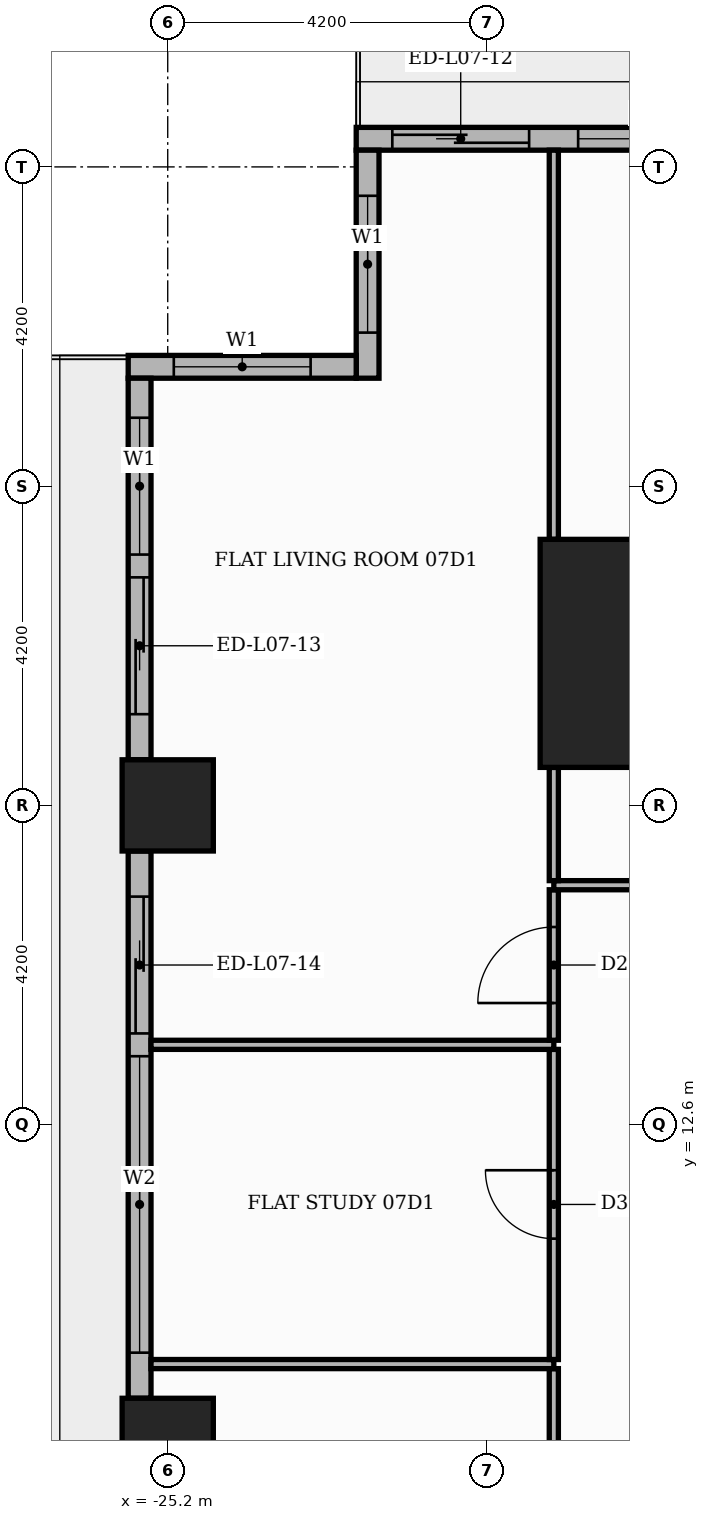
"""IFC4 building model, lengths in metres.
Left out: names, types, materials, properties, quantities, classifications, styles, units other than length and angle.
Written with IfcOpenShell. Run it as: python <this file> out.ifc"""

import sys

from ifc_helpers import new_model, si_unit, direction, frame, frame_2d, origin, origin_2d, place, context, subcontext, project, spatial, rectangle, extrude, element, fill, save


model = new_model("IFC4")
c1 = context("Model", 3, precision=1e-05, world=origin(), true_north=direction((0.0, 1.0)))
c2 = subcontext(c1, "Body", "Model", "MODEL_VIEW")
j1 = project(units=[si_unit("LENGTHUNIT", "METRE"), si_unit("PLANEANGLEUNIT", "RADIAN")], contexts=[c1])
p1 = place(None, origin())
s1 = spatial("IfcSite", under=j1, at=p1, CompositionType="ELEMENT")
p2 = place(p1, origin())
s2 = spatial("IfcBuilding", under=s1, at=p2, CompositionType="ELEMENT")
p3 = place(p2, frame((0.0, 0.0, 34.8)))
s3 = spatial("IfcBuildingStorey", under=s2, at=p3, CompositionType="ELEMENT", Elevation=34.8)
p4 = place(p3, frame((-18.8, 18.8, 0.0), z_axis=(0.0, 0.0, 1.0), x_axis=(1.0, 0.0, 0.0)))
e1 = element("IfcColumn", 1, at=p4, inside=s3, PredefinedType="COLUMN", context=c2, shape_type="SweptSolid", body=[
    extrude(rectangle(XDim=3.0, YDim=3.0, at=origin_2d()), origin(), (0.0, 0.0, 1.0), 3.9),
])
for number, where, z_axis, x_axis in (
    (2, (-25.2, 8.4, 0.0), (0.0, 0.0, 1.0), (1.0, 0.0, 0.0)),
    (3, (-25.2, 16.8, 0.0), (0.0, 0.0, 1.0), (1.0, 0.0, 0.0)),
):
    element("IfcColumn", number, at=place(p3, frame(where, z_axis=z_axis, x_axis=x_axis)), inside=s3, PredefinedType="COLUMN", context=c2, shape_type="SweptSolid", body=[
        extrude(rectangle(XDim=1.2, YDim=1.2, at=origin_2d()), origin(), (0.0, 0.0, 1.0), 3.9),
    ])
p5 = place(p3, frame((-17.4, 25.57, 0.0), z_axis=(0.0, 0.0, 1.0), x_axis=(-1.0, 0.0, 0.0)))
e4 = element("IfcWall", 4, at=p5, inside=s3, PredefinedType="STANDARD", context=c2, shape_type="SweptSolid", body=[
    extrude(rectangle(XDim=5.32, YDim=0.3, at=frame_2d((2.66, 0.0))), origin(), (0.0, 0.0, 1.0), 3.48),
])
p6 = place(p5, frame((0.6, 0.0, 0.9)))
e5 = element("IfcOpeningElement", 5, at=p6, cuts=e4, PredefinedType="OPENING", context=c2, shape_type="SweptSolid", body=[
    extrude(rectangle(XDim=1.8, YDim=2.1, at=frame_2d((0.9, 1.05))), frame((0.0, 0.16, 0.0), z_axis=(0.0, -1.0, 0.0), x_axis=(1.0, 0.0, 0.0)), (0.0, 0.0, 1.0), 0.32),
])
p7 = place(p5, frame((3.045, 0.0, 0.0)))
e6 = element("IfcOpeningElement", 6, at=p7, cuts=e4, PredefinedType="OPENING", context=c2, shape_type="SweptSolid", body=[
    extrude(rectangle(XDim=1.8, YDim=2.4, at=frame_2d((0.9, 1.2))), frame((0.0, 0.16, 0.0), z_axis=(0.0, -1.0, 0.0), x_axis=(1.0, 0.0, 0.0)), (0.0, 0.0, 1.0), 0.32),
])
p8 = place(p3, frame((-22.57, 25.42, 0.0), z_axis=(0.0, 0.0, 1.0), x_axis=(0.0, -1.0, 0.0)))
e7 = element("IfcWall", 7, at=p8, inside=s3, PredefinedType="STANDARD", context=c2, shape_type="SweptSolid", body=[
    extrude(rectangle(XDim=3.0, YDim=0.3, at=frame_2d((1.5, 0.0))), origin(), (0.0, 0.0, 1.0), 3.48),
])
p9 = place(p8, frame((0.6, 0.0, 0.9)))
e8 = element("IfcOpeningElement", 8, at=p9, cuts=e7, PredefinedType="OPENING", context=c2, shape_type="SweptSolid", body=[
    extrude(rectangle(XDim=1.8, YDim=2.1, at=frame_2d((0.9, 1.05))), frame((0.0, 0.16, 0.0), z_axis=(0.0, -1.0, 0.0), x_axis=(1.0, 0.0, 0.0)), (0.0, 0.0, 1.0), 0.32),
])
p10 = place(p3, frame((-22.72, 22.57, 0.0), z_axis=(0.0, 0.0, 1.0), x_axis=(-1.0, 0.0, 0.0)))
e9 = element("IfcWall", 9, at=p10, inside=s3, PredefinedType="STANDARD", context=c2, shape_type="SweptSolid", body=[
    extrude(rectangle(XDim=3.0, YDim=0.3, at=frame_2d((1.5, 0.0))), origin(), (0.0, 0.0, 1.0), 3.48),
])
p11 = place(p10, frame((0.6, 0.0, 0.9)))
e10 = element("IfcOpeningElement", 10, at=p11, cuts=e9, PredefinedType="OPENING", context=c2, shape_type="SweptSolid", body=[
    extrude(rectangle(XDim=1.8, YDim=2.1, at=frame_2d((0.9, 1.05))), frame((0.0, 0.16, 0.0), z_axis=(0.0, -1.0, 0.0), x_axis=(1.0, 0.0, 0.0)), (0.0, 0.0, 1.0), 0.32),
])
p12 = place(p3, frame((-25.57, 22.42, 0.0), z_axis=(0.0, 0.0, 1.0), x_axis=(0.0, -1.0, 0.0)))
e11 = element("IfcWall", 11, at=p12, inside=s3, PredefinedType="STANDARD", context=c2, shape_type="SweptSolid", body=[
    extrude(rectangle(XDim=5.02, YDim=0.3, at=frame_2d((2.51, 0.0))), origin(), (0.0, 0.0, 1.0), 3.48),
])
p13 = place(p12, frame((0.52, 0.0, 0.9)))
e12 = element("IfcOpeningElement", 12, at=p13, cuts=e11, PredefinedType="OPENING", context=c2, shape_type="SweptSolid", body=[
    extrude(rectangle(XDim=1.8, YDim=2.1, at=frame_2d((0.9, 1.05))), frame((0.0, 0.16, 0.0), z_axis=(0.0, -1.0, 0.0), x_axis=(1.0, 0.0, 0.0)), (0.0, 0.0, 1.0), 0.32),
])
p14 = place(p12, frame((2.62, 0.0, 0.0)))
e13 = element("IfcOpeningElement", 13, at=p14, cuts=e11, PredefinedType="OPENING", context=c2, shape_type="SweptSolid", body=[
    extrude(rectangle(XDim=1.8, YDim=2.4, at=frame_2d((0.9, 1.2))), frame((0.0, 0.16, 0.0), z_axis=(0.0, -1.0, 0.0), x_axis=(1.0, 0.0, 0.0)), (0.0, 0.0, 1.0), 0.32),
])
p15 = place(p3, frame((-25.57, 16.2, 0.0), z_axis=(0.0, 0.0, 1.0), x_axis=(0.0, -1.0, 0.0)))
e14 = element("IfcWall", 14, at=p15, inside=s3, PredefinedType="STANDARD", context=c2, shape_type="SweptSolid", body=[
    extrude(rectangle(XDim=7.2, YDim=0.3, at=frame_2d((3.6, 0.0))), origin(), (0.0, 0.0, 1.0), 3.48),
])
p16 = place(p15, frame((0.6, 0.0, 0.0)))
e15 = element("IfcOpeningElement", 15, at=p16, cuts=e14, PredefinedType="OPENING", context=c2, shape_type="SweptSolid", body=[
    extrude(rectangle(XDim=1.8, YDim=2.4, at=frame_2d((0.9, 1.2))), frame((0.0, 0.16, 0.0), z_axis=(0.0, -1.0, 0.0), x_axis=(1.0, 0.0, 0.0)), (0.0, 0.0, 1.0), 0.32),
])
p17 = place(p15, frame((2.7, 0.0, 0.9)))
e16 = element("IfcOpeningElement", 16, at=p17, cuts=e14, PredefinedType="OPENING", context=c2, shape_type="SweptSolid", body=[
    extrude(rectangle(XDim=3.9, YDim=2.1, at=frame_2d((1.95, 1.05))), frame((0.0, 0.16, 0.0), z_axis=(0.0, -1.0, 0.0), x_axis=(1.0, 0.0, 0.0)), (0.0, 0.0, 1.0), 0.32),
])
p18 = place(p3, frame((-20.12, 3.21, 0.0), z_axis=(0.0, 0.0, 1.0), x_axis=(0.0, 1.0, 0.0)))
e17 = element("IfcWall", 17, at=p18, inside=s3, PredefinedType="PARTITIONING", context=c2, shape_type="SweptSolid", body=[
    extrude(rectangle(XDim=6.18, YDim=0.12, at=frame_2d((3.09, 0.0))), origin(), (0.0, 0.0, 1.0), 3.48),
])
p19 = place(p18, frame((2.64, 0.0, 0.0)))
e18 = element("IfcOpeningElement", 18, at=p19, cuts=e17, PredefinedType="OPENING", context=c2, shape_type="SweptSolid", body=[
    extrude(rectangle(XDim=0.9, YDim=2.1, at=frame_2d((0.45, 1.05))), frame((0.0, 0.07, 0.0), z_axis=(0.0, -1.0, 0.0), x_axis=(1.0, 0.0, 0.0)), (0.0, 0.0, 1.0), 0.14),
])
p20 = place(p3, frame((-25.42, 9.45, 0.0), z_axis=(0.0, 0.0, 1.0), x_axis=(1.0, 0.0, 0.0)))
e19 = element("IfcWall", 19, at=p20, inside=s3, PredefinedType="PARTITIONING", context=c2, shape_type="SweptSolid", body=[
    extrude(rectangle(XDim=5.3, YDim=0.12, at=frame_2d((2.65, 0.0))), origin(), (0.0, 0.0, 1.0), 3.48),
])
p21 = place(p3, frame((-20.12, 9.51, 0.0), z_axis=(0.0, 0.0, 1.0), x_axis=(0.0, 1.0, 0.0)))
e20 = element("IfcWall", 20, at=p21, inside=s3, PredefinedType="PARTITIONING", context=c2, shape_type="SweptSolid", body=[
    extrude(rectangle(XDim=4.08, YDim=0.12, at=frame_2d((2.04, 0.0))), origin(), (0.0, 0.0, 1.0), 3.48),
])
p22 = place(p21, frame((1.59, 0.0, 0.0)))
e21 = element("IfcOpeningElement", 21, at=p22, cuts=e20, PredefinedType="OPENING", context=c2, shape_type="SweptSolid", body=[
    extrude(rectangle(XDim=0.9, YDim=2.1, at=frame_2d((0.45, 1.05))), frame((0.0, 0.07, 0.0), z_axis=(0.0, -1.0, 0.0), x_axis=(1.0, 0.0, 0.0)), (0.0, 0.0, 1.0), 0.14),
])
p23 = place(p3, frame((-25.42, 13.65, 0.0), z_axis=(0.0, 0.0, 1.0), x_axis=(1.0, 0.0, 0.0)))
e22 = element("IfcWall", 22, at=p23, inside=s3, PredefinedType="PARTITIONING", context=c2, shape_type="SweptSolid", body=[
    extrude(rectangle(XDim=5.3, YDim=0.12, at=frame_2d((2.65, 0.0))), origin(), (0.0, 0.0, 1.0), 3.48),
])
p24 = place(p3, frame((-20.12, 13.71, 0.0), z_axis=(0.0, 0.0, 1.0), x_axis=(0.0, 1.0, 0.0)))
e23 = element("IfcWall", 23, at=p24, inside=s3, PredefinedType="PARTITIONING", context=c2, shape_type="SweptSolid", body=[
    extrude(rectangle(XDim=1.98, YDim=0.12, at=frame_2d((0.99, 0.0))), origin(), (0.0, 0.0, 1.0), 3.48),
])
p25 = place(p24, frame((0.49, 0.0, 0.0)))
e24 = element("IfcOpeningElement", 24, at=p25, cuts=e23, PredefinedType="OPENING", context=c2, shape_type="SweptSolid", body=[
    extrude(rectangle(XDim=1.0, YDim=2.1, at=frame_2d((0.5, 1.05))), frame((0.0, 0.07, 0.0), z_axis=(0.0, -1.0, 0.0), x_axis=(1.0, 0.0, 0.0)), (0.0, 0.0, 1.0), 0.14),
])
p26 = place(p3, frame((-20.12, 15.75, 0.0), z_axis=(0.0, 0.0, 1.0), x_axis=(1.0, 0.0, 0.0)))
e25 = element("IfcWall", 25, at=p26, inside=s3, PredefinedType="PARTITIONING", context=c2, shape_type="SweptSolid", body=[
    extrude(rectangle(XDim=6.37, YDim=0.12, at=frame_2d((3.185, 0.0))), origin(), (0.0, 0.0, 1.0), 3.48),
])
p27 = place(p26, frame((2.785, 0.0, 0.0)))
e26 = element("IfcOpeningElement", 26, at=p27, cuts=e25, PredefinedType="OPENING", context=c2, shape_type="SweptSolid", body=[
    extrude(rectangle(XDim=0.9, YDim=2.1, at=frame_2d((0.45, 1.05))), frame((0.0, 0.07, 0.0), z_axis=(0.0, -1.0, 0.0), x_axis=(1.0, 0.0, 0.0)), (0.0, 0.0, 1.0), 0.14),
])
p28 = place(p3, frame((-20.12, 15.81, 0.0), z_axis=(0.0, 0.0, 1.0), x_axis=(0.0, 1.0, 0.0)))
e27 = element("IfcWall", 27, at=p28, inside=s3, PredefinedType="PARTITIONING", context=c2, shape_type="SweptSolid", body=[
    extrude(rectangle(XDim=1.49, YDim=0.12, at=frame_2d((0.745, 0.0))), origin(), (0.0, 0.0, 1.0), 3.48),
])
p29 = place(p3, frame((-20.12, 20.3, 0.0), z_axis=(0.0, 0.0, 1.0), x_axis=(0.0, 1.0, 0.0)))
e28 = element("IfcWall", 28, at=p29, inside=s3, PredefinedType="PARTITIONING", context=c2, shape_type="SweptSolid", body=[
    extrude(rectangle(XDim=5.12, YDim=0.12, at=frame_2d((2.56, 0.0))), origin(), (0.0, 0.0, 1.0), 3.48),
])
p30 = place(p6, origin())
e29 = element("IfcWindow", 29, at=p30, inside=s3, PartitioningType="SINGLE_PANEL", PredefinedType="WINDOW", context=c2, shape_type="SweptSolid", body=[
    extrude(rectangle(XDim=1.8, YDim=2.1, at=frame_2d((0.9, 1.05))), frame((0.0, 0.03, 0.0), z_axis=(0.0, -1.0, 0.0), x_axis=(1.0, 0.0, 0.0)), (0.0, 0.0, 1.0), 0.06),
])
fill(e5, e29)
p31 = place(p7, origin())
e30 = element("IfcDoor", 30, at=p31, inside=s3, OperationType="SLIDING_TO_RIGHT", PredefinedType="DOOR", context=c2, shape_type="SweptSolid", body=[
    extrude(rectangle(XDim=1.8, YDim=2.4, at=frame_2d((0.9, 1.2))), frame((0.0, 0.025, 0.0), z_axis=(0.0, -1.0, 0.0), x_axis=(1.0, 0.0, 0.0)), (0.0, 0.0, 1.0), 0.05),
])
fill(e6, e30)
p32 = place(p9, origin())
e31 = element("IfcWindow", 31, at=p32, inside=s3, PartitioningType="SINGLE_PANEL", PredefinedType="WINDOW", context=c2, shape_type="SweptSolid", body=[
    extrude(rectangle(XDim=1.8, YDim=2.1, at=frame_2d((0.9, 1.05))), frame((0.0, 0.03, 0.0), z_axis=(0.0, -1.0, 0.0), x_axis=(1.0, 0.0, 0.0)), (0.0, 0.0, 1.0), 0.06),
])
fill(e8, e31)
p33 = place(p11, origin())
e32 = element("IfcWindow", 32, at=p33, inside=s3, PartitioningType="SINGLE_PANEL", PredefinedType="WINDOW", context=c2, shape_type="SweptSolid", body=[
    extrude(rectangle(XDim=1.8, YDim=2.1, at=frame_2d((0.9, 1.05))), frame((0.0, 0.03, 0.0), z_axis=(0.0, -1.0, 0.0), x_axis=(1.0, 0.0, 0.0)), (0.0, 0.0, 1.0), 0.06),
])
fill(e10, e32)
p34 = place(p13, origin())
e33 = element("IfcWindow", 33, at=p34, inside=s3, PartitioningType="SINGLE_PANEL", PredefinedType="WINDOW", context=c2, shape_type="SweptSolid", body=[
    extrude(rectangle(XDim=1.8, YDim=2.1, at=frame_2d((0.9, 1.05))), frame((0.0, 0.03, 0.0), z_axis=(0.0, -1.0, 0.0), x_axis=(1.0, 0.0, 0.0)), (0.0, 0.0, 1.0), 0.06),
])
fill(e12, e33)
p35 = place(p14, origin())
e34 = element("IfcDoor", 34, at=p35, inside=s3, OperationType="SLIDING_TO_RIGHT", PredefinedType="DOOR", context=c2, shape_type="SweptSolid", body=[
    extrude(rectangle(XDim=1.8, YDim=2.4, at=frame_2d((0.9, 1.2))), frame((0.0, 0.025, 0.0), z_axis=(0.0, -1.0, 0.0), x_axis=(1.0, 0.0, 0.0)), (0.0, 0.0, 1.0), 0.05),
])
fill(e13, e34)
p36 = place(p16, origin())
e35 = element("IfcDoor", 35, at=p36, inside=s3, OperationType="SLIDING_TO_LEFT", PredefinedType="DOOR", context=c2, shape_type="SweptSolid", body=[
    extrude(rectangle(XDim=1.8, YDim=2.4, at=frame_2d((0.9, 1.2))), frame((0.0, 0.025, 0.0), z_axis=(0.0, -1.0, 0.0), x_axis=(1.0, 0.0, 0.0)), (0.0, 0.0, 1.0), 0.05),
])
fill(e15, e35)
p37 = place(p17, origin())
e36 = element("IfcWindow", 36, at=p37, inside=s3, PartitioningType="SINGLE_PANEL", PredefinedType="WINDOW", context=c2, shape_type="SweptSolid", body=[
    extrude(rectangle(XDim=3.9, YDim=2.1, at=frame_2d((1.95, 1.05))), frame((0.0, 0.03, 0.0), z_axis=(0.0, -1.0, 0.0), x_axis=(1.0, 0.0, 0.0)), (0.0, 0.0, 1.0), 0.06),
])
fill(e16, e36)
p38 = place(p25, origin())
e37 = element("IfcDoor", 37, at=p38, inside=s3, OperationType="SINGLE_SWING_LEFT", PredefinedType="DOOR", context=c2, shape_type="SweptSolid", body=[
    extrude(rectangle(XDim=1.0, YDim=2.1, at=frame_2d((0.5, 1.05))), frame((0.0, 0.025, 0.0), z_axis=(0.0, -1.0, 0.0), x_axis=(1.0, 0.0, 0.0)), (0.0, 0.0, 1.0), 0.05),
])
fill(e24, e37)
p39 = place(p22, origin())
e38 = element("IfcDoor", 38, at=p39, inside=s3, OperationType="SINGLE_SWING_RIGHT", PredefinedType="DOOR", context=c2, shape_type="SweptSolid", body=[
    extrude(rectangle(XDim=0.9, YDim=2.1, at=frame_2d((0.45, 1.05))), frame((0.0, 0.025, 0.0), z_axis=(0.0, -1.0, 0.0), x_axis=(1.0, 0.0, 0.0)), (0.0, 0.0, 1.0), 0.05),
])
fill(e21, e38)
save(model, sys.argv[1])
